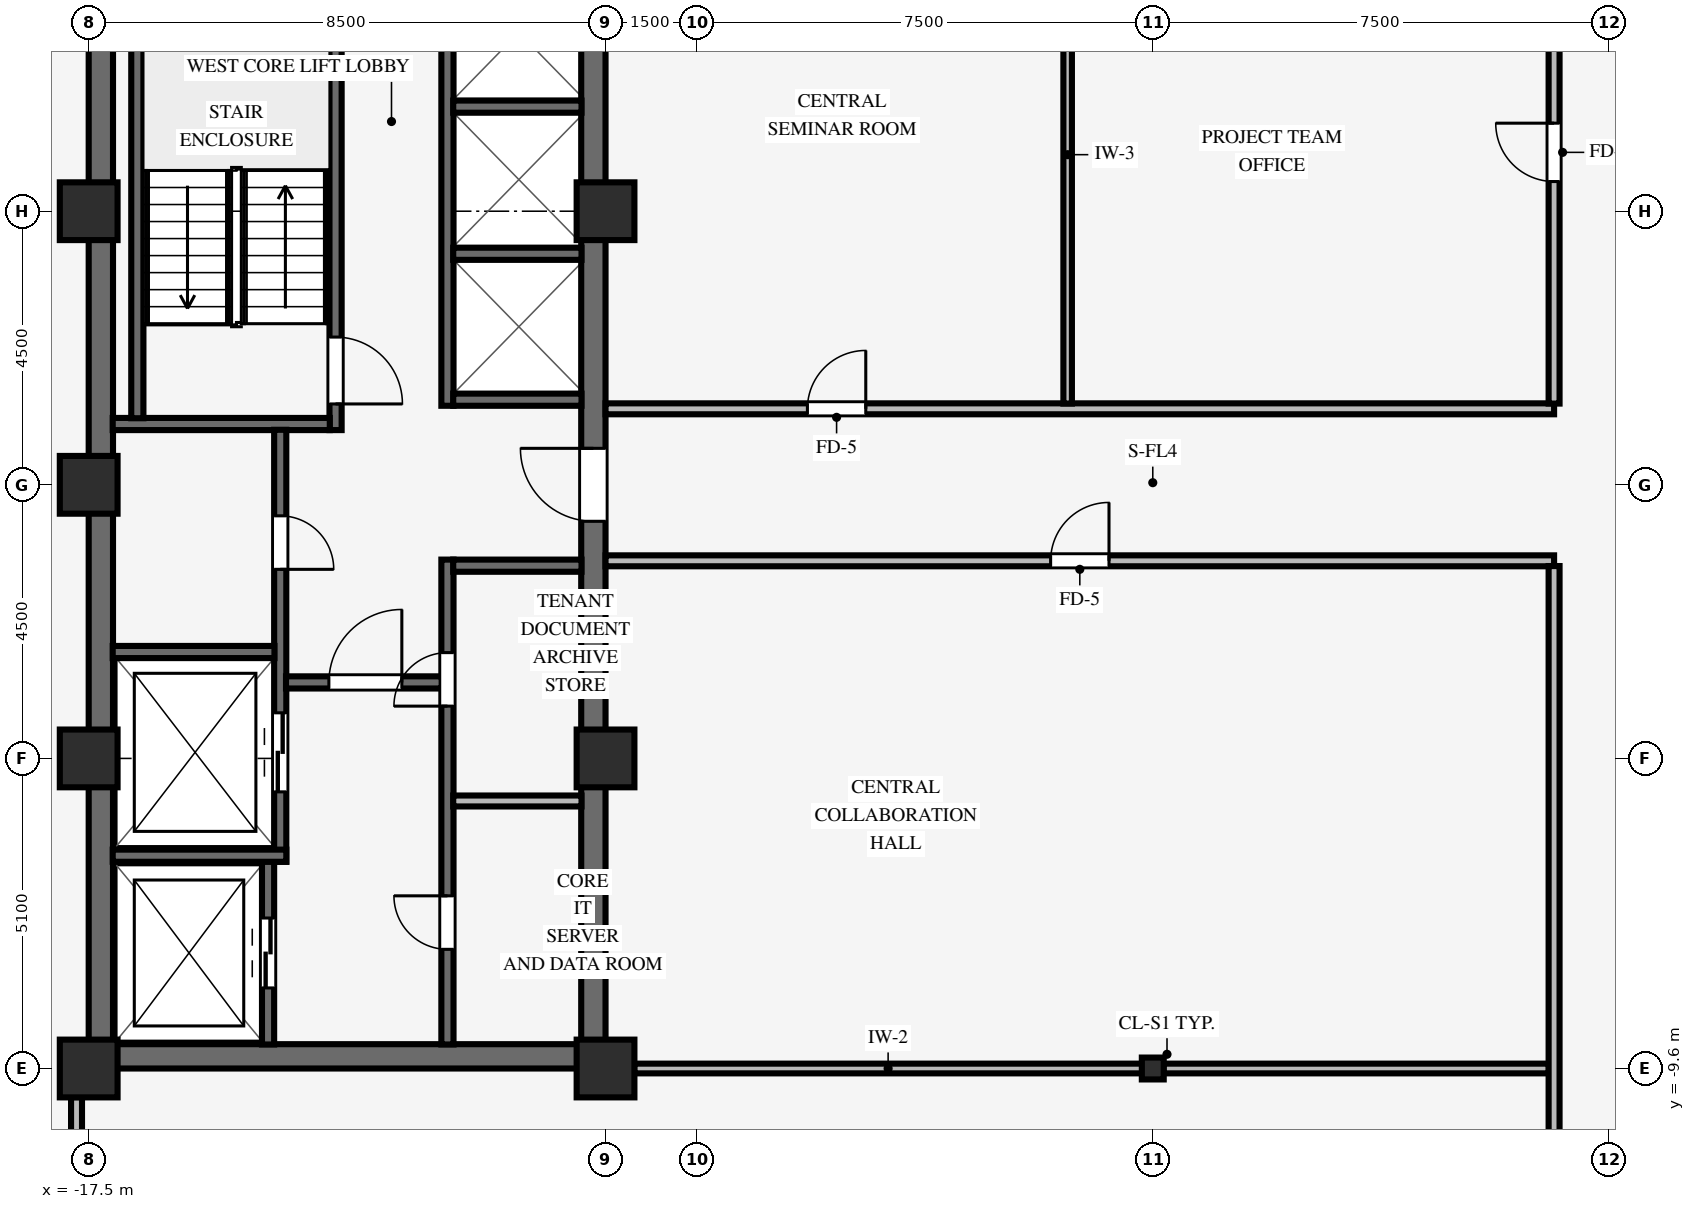
"""IFC4 building model, lengths in metres.
Left out: names, types, materials, properties, quantities, classifications, styles, units other than length and angle.
Written with IfcOpenShell. Run it as: python <this file> out.ifc"""

import sys

from ifc_helpers import new_model, si_unit, direction, frame, frame_2d, origin, origin_2d, place, context, subcontext, project, spatial, rectangle, i_section, extrude, source, transform, mapped, element, fill, save


model = new_model("IFC4")
c1 = context("Model", 3, precision=1e-05, world=origin(), true_north=direction((0.0, 1.0)))
c2 = subcontext(c1, "Body", "Model", "MODEL_VIEW")
j1 = project(units=[si_unit("LENGTHUNIT", "METRE"), si_unit("PLANEANGLEUNIT", "RADIAN")], contexts=[c1])
p1 = place(None, origin())
s1 = spatial("IfcSite", under=j1, at=p1, CompositionType="ELEMENT")
p2 = place(p1, origin())
s2 = spatial("IfcBuilding", under=s1, at=p2, CompositionType="ELEMENT")
p3 = place(p2, frame((0.0, 0.0, 160.35)))
s3 = spatial("IfcBuildingStorey", under=s2, at=p3, CompositionType="ELEMENT", Elevation=160.35)
p4 = place(p3, frame((-17.5, -9.4, 0.0), z_axis=(0.0, 0.0, 1.0), x_axis=(1.0, 0.0, 0.0)))
e1 = element("IfcWall", 1, at=p4, inside=s3, PredefinedType="SHEAR", context=c2, shape_type="SweptSolid", body=[
    extrude(rectangle(XDim=8.5, YDim=0.4, at=frame_2d((4.25, 0.0))), origin(), (0.0, 0.0, 1.0), 3.37),
])
p5 = place(p3, frame((-17.3, -9.205, 0.0), z_axis=(0.0, 0.0, 1.0), x_axis=(0.0, 1.0, 0.0)))
e2 = element("IfcWall", 2, at=p5, inside=s3, PredefinedType="SHEAR", context=c2, shape_type="SweptSolid", body=[
    extrude(rectangle(XDim=18.41, YDim=0.4, at=frame_2d((9.205, 0.0))), origin(), (0.0, 0.0, 1.0), 3.37),
])
p6 = place(p3, frame((-9.2, -9.205, 0.0), z_axis=(0.0, 0.0, 1.0), x_axis=(0.0, 1.0, 0.0)))
e3 = element("IfcWall", 3, at=p6, inside=s3, PredefinedType="SHEAR", context=c2, shape_type="SweptSolid", body=[
    extrude(rectangle(XDim=18.41, YDim=0.4, at=frame_2d((9.205, 0.0))), origin(), (0.0, 0.0, 1.0), 3.37),
])
p7 = place(p6, frame((8.605, 0.0, 0.0)))
e4 = element("IfcOpeningElement", 4, at=p7, cuts=e3, PredefinedType="OPENING", context=c2, shape_type="SweptSolid", body=[
    extrude(rectangle(XDim=1.2, YDim=2.15, at=frame_2d((0.6, 1.075))), frame((0.0, 0.21, 0.0), z_axis=(0.0, -1.0, 0.0), x_axis=(1.0, 0.0, 0.0)), (0.0, 0.0, 1.0), 0.42),
])
for number, where, z_axis, x_axis in (
    (5, (-17.5, -9.6, 0.0), (0.0, 0.0, 1.0), (1.0, 0.0, 0.0)),
    (6, (-17.5, -4.5, 0.0), (0.0, 0.0, 1.0), (1.0, 0.0, 0.0)),
    (7, (-17.5, 4.5, 0.0), (0.0, 0.0, 1.0), (1.0, 0.0, 0.0)),
    (8, (-9.0, -9.6, 0.0), (0.0, 0.0, 1.0), (1.0, 0.0, 0.0)),
    (9, (-9.0, -4.5, 0.0), (0.0, 0.0, 1.0), (1.0, 0.0, 0.0)),
    (10, (-9.0, 4.5, 0.0), (0.0, 0.0, 1.0), (1.0, 0.0, 0.0)),
    (11, (-17.5, 0.0, 0.0), (0.0, 0.0, 1.0), (1.0, 0.0, 0.0)),
):
    element("IfcColumn", number, at=place(p3, frame(where, z_axis=z_axis, x_axis=x_axis)), inside=s3, PredefinedType="COLUMN", context=c2, shape_type="SweptSolid", body=[
        extrude(rectangle(XDim=0.95, YDim=0.95, at=origin_2d()), origin(), (0.0, 0.0, 1.0), 3.37),
    ])
p8 = place(p3, frame((0.0, -9.6, 0.0), z_axis=(0.0, 0.0, 1.0), x_axis=(1.0, 0.0, 0.0)))
e12 = element("IfcColumn", 12, at=p8, inside=s3, PredefinedType="COLUMN", context=c2, shape_type="SweptSolid", body=[
    extrude(i_section(OverallWidth=0.36, OverallDepth=0.36, WebThickness=0.021, FlangeThickness=0.021, FilletRadius=0.018, at=origin_2d()), origin(), (0.0, 0.0, 1.0), 3.37),
])
p9 = place(p3, frame((-13.44, 0.9, 0.0), z_axis=(0.0, 0.0, 1.0), x_axis=(0.0, 1.0, 0.0)))
e13 = element("IfcWall", 13, at=p9, inside=s3, PredefinedType="SHEAR", context=c2, shape_type="SweptSolid", body=[
    extrude(rectangle(XDim=8.305, YDim=0.2, at=frame_2d((4.153, 0.0))), origin(), (0.0, 0.0, 1.0), 3.37),
])
p10 = place(p9, frame((1.53, 0.0, 0.0), z_axis=(0.0, 0.0, 1.0), x_axis=(-1.0, 0.0, 0.0)))
e14 = element("IfcOpeningElement", 14, at=p10, cuts=e13, PredefinedType="OPENING", context=c2, shape_type="SweptSolid", body=[
    extrude(rectangle(XDim=1.1, YDim=2.15, at=frame_2d((0.55, 1.075))), frame((0.0, 0.11, 0.0), z_axis=(0.0, -1.0, 0.0), x_axis=(1.0, 0.0, 0.0)), (0.0, 0.0, 1.0), 0.22),
])
p11 = place(p3, frame((-17.105, 1.0, 0.0), z_axis=(0.0, 0.0, 1.0), x_axis=(1.0, 0.0, 0.0)))
e15 = element("IfcWall", 15, at=p11, inside=s3, PredefinedType="SHEAR", context=c2, shape_type="SweptSolid", body=[
    extrude(rectangle(XDim=3.57, YDim=0.2, at=frame_2d((1.785, 0.0))), origin(), (0.0, 0.0, 1.0), 3.37),
])
p12 = place(p3, frame((-16.7, 1.095, 0.0), z_axis=(0.0, 0.0, 1.0), x_axis=(0.0, 1.0, 0.0)))
e16 = element("IfcWall", 16, at=p12, inside=s3, PredefinedType="SHEAR", context=c2, shape_type="SweptSolid", body=[
    extrude(rectangle(XDim=8.11, YDim=0.2, at=frame_2d((4.055, 0.0))), origin(), (0.0, 0.0, 1.0), 3.37),
])
p13 = place(p3, frame((-14.55, -9.205, 0.0), z_axis=(0.0, 0.0, 1.0), x_axis=(0.0, 1.0, 0.0)))
e17 = element("IfcWall", 17, at=p13, inside=s3, PredefinedType="SHEAR", context=c2, shape_type="SweptSolid", body=[
    extrude(rectangle(XDim=3.01, YDim=0.2, at=frame_2d((1.505, 0.0))), origin(), (0.0, 0.0, 1.0), 3.37),
])
p14 = place(p13, frame((0.93, 0.0, 0.0)))
e18 = element("IfcOpeningElement", 18, at=p14, cuts=e17, PredefinedType="OPENING", context=c2, shape_type="SweptSolid", body=[
    extrude(rectangle(XDim=1.15, YDim=2.15, at=frame_2d((0.575, 1.075))), frame((0.0, 0.11, 0.0), z_axis=(0.0, -1.0, 0.0), x_axis=(1.0, 0.0, 0.0)), (0.0, 0.0, 1.0), 0.22),
])
p15 = place(p3, frame((-14.35, -6.2, 0.0), z_axis=(0.0, 0.0, 1.0), x_axis=(0.0, 1.0, 0.0)))
e19 = element("IfcWall", 19, at=p15, inside=s3, PredefinedType="SHEAR", context=c2, shape_type="SweptSolid", body=[
    extrude(rectangle(XDim=7.105, YDim=0.2, at=frame_2d((3.552, 0.0))), origin(), (0.0, 0.0, 1.0), 3.37),
])
p16 = place(p15, frame((5.69, 0.0, 0.0), z_axis=(0.0, 0.0, 1.0), x_axis=(-1.0, 0.0, 0.0)))
e20 = element("IfcOpeningElement", 20, at=p16, cuts=e19, PredefinedType="OPENING", context=c2, shape_type="SweptSolid", body=[
    extrude(rectangle(XDim=0.88, YDim=2.1, at=frame_2d((0.44, 1.05))), frame((0.0, 0.11, 0.0), z_axis=(0.0, -1.0, 0.0), x_axis=(1.0, 0.0, 0.0)), (0.0, 0.0, 1.0), 0.22),
])
p17 = place(p15, frame((1.15, 0.0, 0.0)))
e21 = element("IfcOpeningElement", 21, at=p17, cuts=e19, PredefinedType="OPENING", context=c2, shape_type="SweptSolid", body=[
    extrude(rectangle(XDim=1.3, YDim=2.2, at=frame_2d((0.65, 1.1))), frame((0.0, 0.11, 0.0), z_axis=(0.0, -1.0, 0.0), x_axis=(1.0, 0.0, 0.0)), (0.0, 0.0, 1.0), 0.22),
])
p18 = place(p3, frame((-17.105, -6.1, 0.0), z_axis=(0.0, 0.0, 1.0), x_axis=(1.0, 0.0, 0.0)))
e22 = element("IfcWall", 22, at=p18, inside=s3, PredefinedType="SHEAR", context=c2, shape_type="SweptSolid", body=[
    extrude(rectangle(XDim=2.855, YDim=0.2, at=frame_2d((1.427, 0.0))), origin(), (0.0, 0.0, 1.0), 3.37),
])
p19 = place(p3, frame((-17.105, -2.75, 0.0), z_axis=(0.0, 0.0, 1.0), x_axis=(1.0, 0.0, 0.0)))
e23 = element("IfcWall", 23, at=p19, inside=s3, PredefinedType="SHEAR", context=c2, shape_type="SweptSolid", body=[
    extrude(rectangle(XDim=2.66, YDim=0.2, at=frame_2d((1.33, 0.0))), origin(), (0.0, 0.0, 1.0), 3.37),
])
p20 = place(p3, frame((-11.6, -9.205, 0.0), z_axis=(0.0, 0.0, 1.0), x_axis=(0.0, 1.0, 0.0)))
e24 = element("IfcWall", 24, at=p20, inside=s3, PredefinedType="SHEAR", context=c2, shape_type="SweptSolid", body=[
    extrude(rectangle(XDim=7.975, YDim=0.2, at=frame_2d((3.988, 0.0))), origin(), (0.0, 0.0, 1.0), 3.37),
])
p21 = place(p20, frame((1.565, 0.0, 0.0)))
e25 = element("IfcOpeningElement", 25, at=p21, cuts=e24, PredefinedType="OPENING", context=c2, shape_type="SweptSolid", body=[
    extrude(rectangle(XDim=0.88, YDim=2.1, at=frame_2d((0.44, 1.05))), frame((0.0, 0.11, 0.0), z_axis=(0.0, -1.0, 0.0), x_axis=(1.0, 0.0, 0.0)), (0.0, 0.0, 1.0), 0.22),
])
p22 = place(p20, frame((5.565, 0.0, 0.0)))
e26 = element("IfcOpeningElement", 26, at=p22, cuts=e24, PredefinedType="OPENING", context=c2, shape_type="SweptSolid", body=[
    extrude(rectangle(XDim=0.88, YDim=2.1, at=frame_2d((0.44, 1.05))), frame((0.0, 0.11, 0.0), z_axis=(0.0, -1.0, 0.0), x_axis=(1.0, 0.0, 0.0)), (0.0, 0.0, 1.0), 0.22),
])
p23 = place(p3, frame((-14.255, -3.25, 0.0), z_axis=(0.0, 0.0, 1.0), x_axis=(1.0, 0.0, 0.0)))
e27 = element("IfcWall", 27, at=p23, inside=s3, PredefinedType="SHEAR", context=c2, shape_type="SweptSolid", body=[
    extrude(rectangle(XDim=2.56, YDim=0.2, at=frame_2d((1.28, 0.0))), origin(), (0.0, 0.0, 1.0), 3.37),
])
p24 = place(p23, frame((0.705, 0.0, 0.0)))
e28 = element("IfcOpeningElement", 28, at=p24, cuts=e27, PredefinedType="OPENING", context=c2, shape_type="SweptSolid", body=[
    extrude(rectangle(XDim=1.2, YDim=2.15, at=frame_2d((0.6, 1.075))), frame((0.0, 0.11, 0.0), z_axis=(0.0, -1.0, 0.0), x_axis=(1.0, 0.0, 0.0)), (0.0, 0.0, 1.0), 0.22),
])
p25 = place(p3, frame((-11.505, -1.33, 0.0), z_axis=(0.0, 0.0, 1.0), x_axis=(1.0, 0.0, 0.0)))
e29 = element("IfcWall", 29, at=p25, inside=s3, PredefinedType="SHEAR", context=c2, shape_type="SweptSolid", body=[
    extrude(rectangle(XDim=2.11, YDim=0.2, at=frame_2d((1.055, 0.0))), origin(), (0.0, 0.0, 1.0), 3.37),
])
p26 = place(p3, frame((-11.505, -5.2, 0.0), z_axis=(0.0, 0.0, 1.0), x_axis=(1.0, 0.0, 0.0)))
e30 = element("IfcWall", 30, at=p26, inside=s3, PredefinedType="PARTITIONING", context=c2, shape_type="SweptSolid", body=[
    extrude(rectangle(XDim=2.11, YDim=0.18, at=frame_2d((1.055, 0.0))), origin(), (0.0, 0.0, 1.0), 3.36),
])
p27 = place(p3, frame((-11.6, 1.3, 0.0), z_axis=(0.0, 0.0, 1.0), x_axis=(0.0, 1.0, 0.0)))
e31 = element("IfcWall", 31, at=p27, inside=s3, PredefinedType="SHEAR", context=c2, shape_type="SweptSolid", body=[
    extrude(rectangle(XDim=7.905, YDim=0.2, at=frame_2d((3.953, 0.0))), origin(), (0.0, 0.0, 1.0), 3.37),
])
for number, where, z_axis, x_axis in (
    (32, (-11.505, 1.4, 0.0), (0.0, 0.0, 1.0), (1.0, 0.0, 0.0)),
    (33, (-11.505, 3.8, 0.0), (0.0, 0.0, 1.0), (1.0, 0.0, 0.0)),
    (34, (-11.505, 6.22, 0.0), (0.0, 0.0, 1.0), (1.0, 0.0, 0.0)),
):
    element("IfcWall", number, at=place(p3, frame(where, z_axis=z_axis, x_axis=x_axis)), inside=s3, PredefinedType="SHEAR", context=c2, shape_type="SweptSolid", body=[
        extrude(rectangle(XDim=2.11, YDim=0.2, at=frame_2d((1.055, 0.0))), origin(), (0.0, 0.0, 1.0), 3.37),
    ])
p28 = place(p3, frame((-8.529, -9.6, 0.0), z_axis=(0.0, 0.0, 1.0), x_axis=(1.0, 0.0, 0.0)))
e35 = element("IfcWall", 35, at=p28, inside=s3, PredefinedType="PARTITIONING", context=c2, shape_type="SweptSolid", body=[
    extrude(rectangle(XDim=8.353, YDim=0.16, at=frame_2d((4.177, 0.0))), origin(), (0.0, 0.0, 1.0), 2.405),
])
p29 = place(p3, frame((0.176, -9.6, 0.0), z_axis=(0.0, 0.0, 1.0), x_axis=(1.0, 0.0, 0.0)))
e36 = element("IfcWall", 36, at=p29, inside=s3, PredefinedType="PARTITIONING", context=c2, shape_type="SweptSolid", body=[
    extrude(rectangle(XDim=6.338, YDim=0.16, at=frame_2d((3.169, 0.0))), origin(), (0.0, 0.0, 1.0), 2.405),
])
p30 = place(p3, frame((-9.0, -1.25, 0.0), z_axis=(0.0, 0.0, 1.0), x_axis=(1.0, 0.0, 0.0)))
e37 = element("IfcWall", 37, at=p30, inside=s3, PredefinedType="PARTITIONING", context=c2, shape_type="SweptSolid", body=[
    extrude(rectangle(XDim=15.6, YDim=0.18, at=frame_2d((7.8, 0.0))), origin(), (0.0, 0.0, 1.0), 3.36),
])
p31 = place(p30, frame((7.32, 0.0, 0.0)))
e38 = element("IfcOpeningElement", 38, at=p31, cuts=e37, PredefinedType="OPENING", context=c2, shape_type="SweptSolid", body=[
    extrude(rectangle(XDim=0.96, YDim=2.1, at=frame_2d((0.48, 1.05))), frame((0.0, 0.1, 0.0), z_axis=(0.0, -1.0, 0.0), x_axis=(1.0, 0.0, 0.0)), (0.0, 0.0, 1.0), 0.2),
])
p32 = place(p3, frame((-9.0, 1.25, 0.0), z_axis=(0.0, 0.0, 1.0), x_axis=(1.0, 0.0, 0.0)))
e39 = element("IfcWall", 39, at=p32, inside=s3, PredefinedType="PARTITIONING", context=c2, shape_type="SweptSolid", body=[
    extrude(rectangle(XDim=15.6, YDim=0.18, at=frame_2d((7.8, 0.0))), origin(), (0.0, 0.0, 1.0), 3.36),
])
p33 = place(p32, frame((3.32, 0.0, 0.0)))
e40 = element("IfcOpeningElement", 40, at=p33, cuts=e39, PredefinedType="OPENING", context=c2, shape_type="SweptSolid", body=[
    extrude(rectangle(XDim=0.96, YDim=2.1, at=frame_2d((0.48, 1.05))), frame((0.0, 0.1, 0.0), z_axis=(0.0, -1.0, 0.0), x_axis=(1.0, 0.0, 0.0)), (0.0, 0.0, 1.0), 0.2),
])
p34 = place(p3, frame((-17.7, -13.414, 0.0), z_axis=(0.0, 0.0, 1.0), x_axis=(0.0, 1.0, 0.0)))
e41 = element("IfcWall", 41, at=p34, inside=s3, PredefinedType="PARTITIONING", context=c2, shape_type="SweptSolid", body=[
    extrude(rectangle(XDim=3.343, YDim=0.18, at=frame_2d((1.671, 0.0))), origin(), (0.0, 0.0, 1.0), 2.816),
])
p35 = place(p3, frame((-1.4, 1.336, 0.0), z_axis=(0.0, 0.0, 1.0), x_axis=(0.0, 1.0, 0.0)))
e42 = element("IfcWall", 42, at=p35, inside=s3, PredefinedType="PARTITIONING", context=c2, shape_type="SweptSolid", body=[
    extrude(rectangle(XDim=8.188, YDim=0.14, at=frame_2d((4.094, 0.0))), origin(), (0.0, 0.0, 1.0), 3.36),
])
p36 = place(p3, frame((6.6, -13.414, 0.0), z_axis=(0.0, 0.0, 1.0), x_axis=(0.0, 1.0, 0.0)))
e43 = element("IfcWall", 43, at=p36, inside=s3, PredefinedType="PARTITIONING", context=c2, shape_type="SweptSolid", body=[
    extrude(rectangle(XDim=12.078, YDim=0.18, at=frame_2d((6.039, 0.0))), origin(), (0.0, 0.0, 1.0), 3.36),
])
p37 = place(p3, frame((6.6, 1.336, 0.0), z_axis=(0.0, 0.0, 1.0), x_axis=(0.0, 1.0, 0.0)))
e44 = element("IfcWall", 44, at=p37, inside=s3, PredefinedType="PARTITIONING", context=c2, shape_type="SweptSolid", body=[
    extrude(rectangle(XDim=12.078, YDim=0.18, at=frame_2d((6.039, 0.0))), origin(), (0.0, 0.0, 1.0), 3.36),
])
p38 = place(p37, frame((3.652, 0.0, 0.0)))
e45 = element("IfcOpeningElement", 45, at=p38, cuts=e44, PredefinedType="OPENING", context=c2, shape_type="SweptSolid", body=[
    extrude(rectangle(XDim=0.96, YDim=2.1, at=frame_2d((0.48, 1.05))), frame((0.0, 0.1, 0.0), z_axis=(0.0, -1.0, 0.0), x_axis=(1.0, 0.0, 0.0)), (0.0, 0.0, 1.0), 0.2),
])
m1 = source(origin(), c2, "Body", "SweptSolid", [
    extrude(rectangle(XDim=1.1, YDim=2.15, at=frame_2d((0.55, 1.075))), frame((0.0, 0.025, 0.0), z_axis=(0.0, -1.0, 0.0), x_axis=(1.0, 0.0, 0.0)), (0.0, 0.0, 1.0), 0.05),
])
p39 = place(p10, origin())
e46 = element("IfcDoor", 46, at=p39, inside=s3, OperationType="SINGLE_SWING_RIGHT", PredefinedType="DOOR", context=c2, shape_type="MappedRepresentation", body=[
    mapped(m1, transform((0.0, 0.0, 0.0), scale=1.0)),
])
fill(e14, e46)
m2 = source(origin(), c2, "Body", "SweptSolid", [
    extrude(rectangle(XDim=0.88, YDim=2.1, at=frame_2d((0.44, 1.05))), frame((0.0, 0.025, 0.0), z_axis=(0.0, -1.0, 0.0), x_axis=(1.0, 0.0, 0.0)), (0.0, 0.0, 1.0), 0.05),
])
p40 = place(p16, origin())
e47 = element("IfcDoor", 47, at=p40, inside=s3, OperationType="SINGLE_SWING_RIGHT", PredefinedType="DOOR", context=c2, shape_type="MappedRepresentation", body=[
    mapped(m2, transform((0.0, 0.0, 0.0), scale=1.0)),
])
fill(e20, e47)
m3 = source(origin(), c2, "Body", "SweptSolid", [
    extrude(rectangle(XDim=1.2, YDim=2.15, at=frame_2d((0.6, 1.075))), frame((0.0, 0.025, 0.0), z_axis=(0.0, -1.0, 0.0), x_axis=(1.0, 0.0, 0.0)), (0.0, 0.0, 1.0), 0.05),
])
p41 = place(p24, origin())
e48 = element("IfcDoor", 48, at=p41, inside=s3, OperationType="SINGLE_SWING_RIGHT", PredefinedType="DOOR", context=c2, shape_type="MappedRepresentation", body=[
    mapped(m3, transform((0.0, 0.0, 0.0), scale=1.0)),
])
fill(e28, e48)
p42 = place(p21, origin())
e49 = element("IfcDoor", 49, at=p42, inside=s3, OperationType="SINGLE_SWING_RIGHT", PredefinedType="DOOR", context=c2, shape_type="MappedRepresentation", body=[
    mapped(m2, transform((0.0, 0.0, 0.0), scale=1.0)),
])
fill(e25, e49)
p43 = place(p22, origin())
e50 = element("IfcDoor", 50, at=p43, inside=s3, OperationType="SINGLE_SWING_LEFT", PredefinedType="DOOR", context=c2, shape_type="MappedRepresentation", body=[
    mapped(m2, transform((0.0, 0.0, 0.0), scale=1.0)),
])
fill(e26, e50)
p44 = place(p7, origin())
e51 = element("IfcDoor", 51, at=p44, inside=s3, OperationType="SINGLE_SWING_RIGHT", PredefinedType="DOOR", context=c2, shape_type="MappedRepresentation", body=[
    mapped(m3, transform((0.0, 0.0, 0.0), scale=1.0)),
])
fill(e4, e51)
m4 = source(origin(), c2, "Body", "SweptSolid", [
    extrude(rectangle(XDim=1.15, YDim=2.15, at=frame_2d((0.575, 1.075))), frame((0.0, 0.025, 0.0), z_axis=(0.0, -1.0, 0.0), x_axis=(1.0, 0.0, 0.0)), (0.0, 0.0, 1.0), 0.05),
])
p45 = place(p14, origin())
e52 = element("IfcDoor", 52, at=p45, inside=s3, OperationType="DOUBLE_DOOR_SLIDING", PredefinedType="DOOR", context=c2, shape_type="MappedRepresentation", body=[
    mapped(m4, transform((0.0, 0.0, 0.0), scale=1.0)),
])
fill(e18, e52)
m5 = source(origin(), c2, "Body", "SweptSolid", [
    extrude(rectangle(XDim=1.3, YDim=2.2, at=frame_2d((0.65, 1.1))), frame((0.0, 0.025, 0.0), z_axis=(0.0, -1.0, 0.0), x_axis=(1.0, 0.0, 0.0)), (0.0, 0.0, 1.0), 0.05),
])
p46 = place(p17, origin())
e53 = element("IfcDoor", 53, at=p46, inside=s3, OperationType="DOUBLE_DOOR_SLIDING", PredefinedType="DOOR", context=c2, shape_type="MappedRepresentation", body=[
    mapped(m5, transform((0.0, 0.0, 0.0), scale=1.0)),
])
fill(e21, e53)
m6 = source(origin(), c2, "Body", "SweptSolid", [
    extrude(rectangle(XDim=0.96, YDim=2.1, at=frame_2d((0.48, 1.05))), frame((0.0, 0.025, 0.0), z_axis=(0.0, -1.0, 0.0), x_axis=(1.0, 0.0, 0.0)), (0.0, 0.0, 1.0), 0.05),
])
p47 = place(p31, origin())
e54 = element("IfcDoor", 54, at=p47, inside=s3, OperationType="SINGLE_SWING_RIGHT", PredefinedType="DOOR", context=c2, shape_type="MappedRepresentation", body=[
    mapped(m6, transform((0.0, 0.0, 0.0), scale=1.0)),
])
fill(e38, e54)
p48 = place(p38, origin())
e55 = element("IfcDoor", 55, at=p48, inside=s3, OperationType="SINGLE_SWING_RIGHT", PredefinedType="DOOR", context=c2, shape_type="MappedRepresentation", body=[
    mapped(m6, transform((0.0, 0.0, 0.0), scale=1.0)),
])
fill(e45, e55)
p49 = place(p33, origin())
e56 = element("IfcDoor", 56, at=p49, inside=s3, OperationType="SINGLE_SWING_RIGHT", PredefinedType="DOOR", context=c2, shape_type="MappedRepresentation", body=[
    mapped(m6, transform((0.0, 0.0, 0.0), scale=1.0)),
])
fill(e40, e56)
save(model, sys.argv[1])
